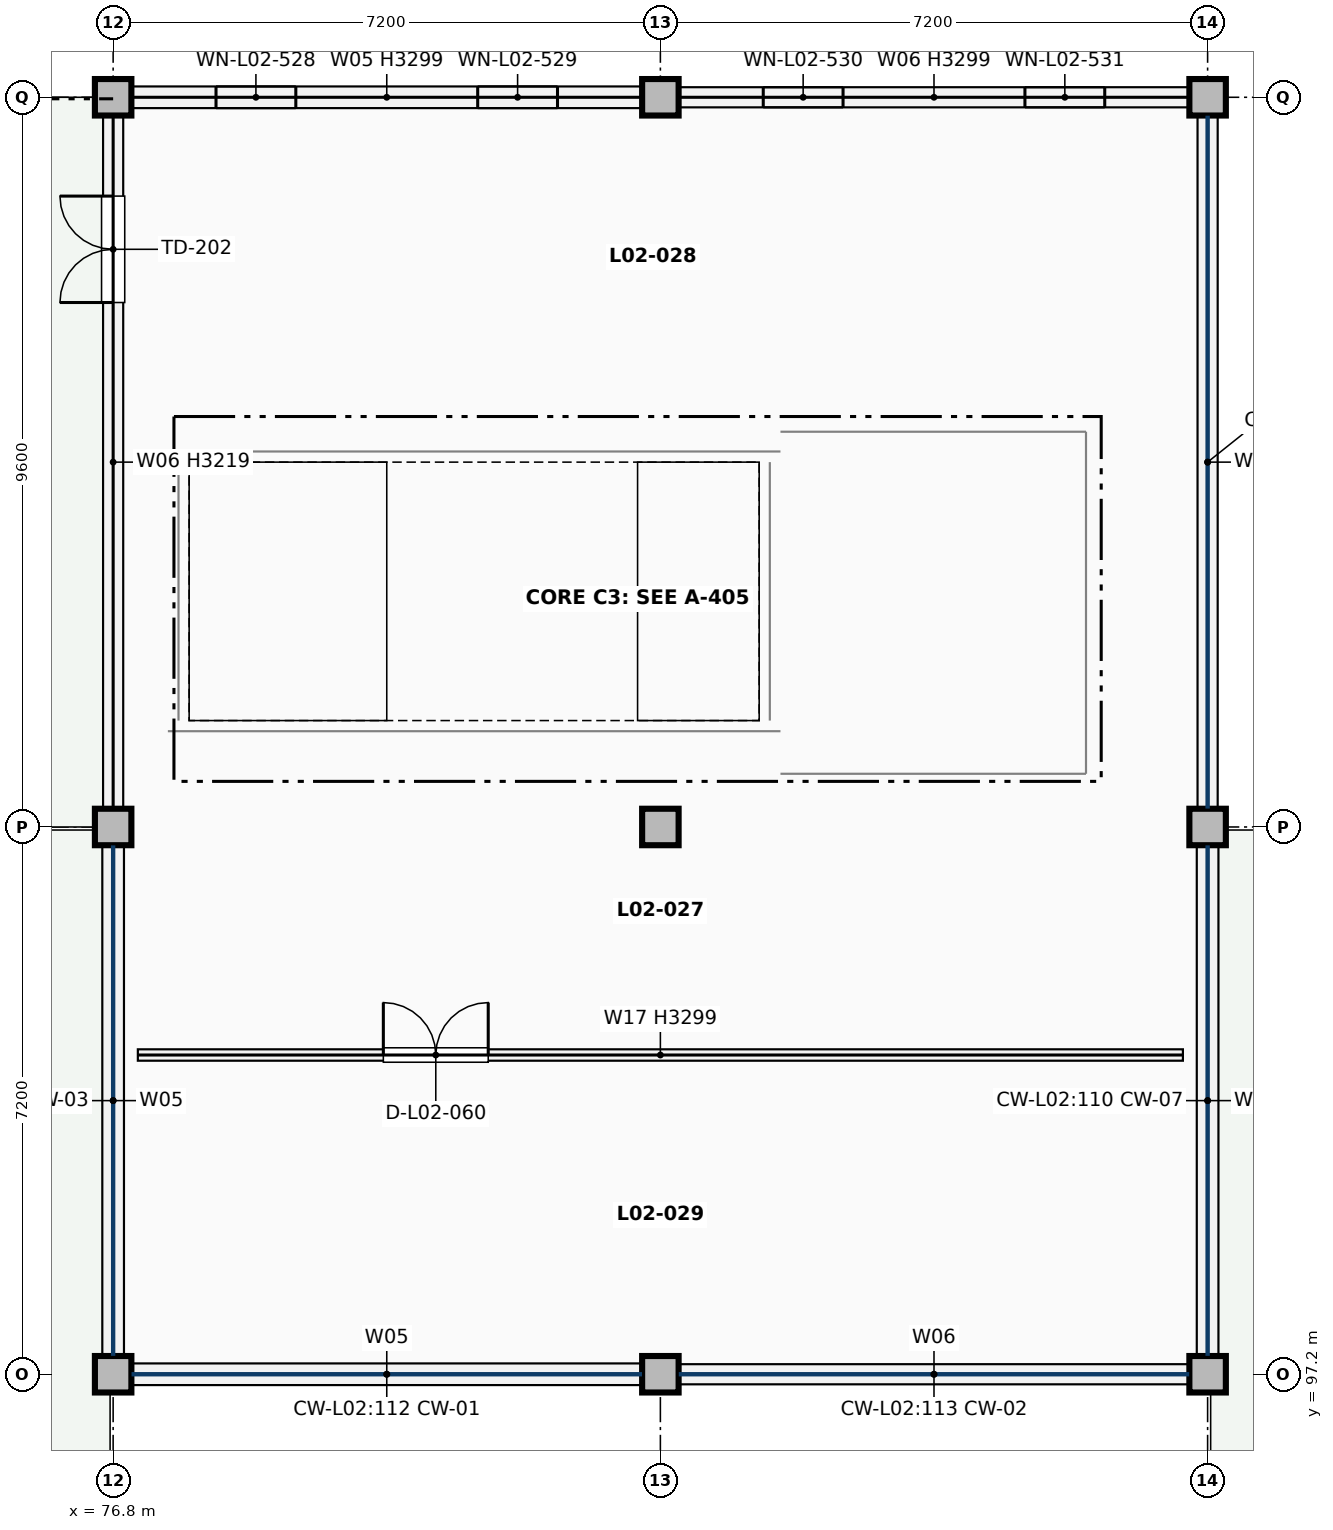
"""IFC4 building model, lengths in metres.
Left out: names, types, materials, properties, quantities, classifications, styles, units other than length and angle.
Written with IfcOpenShell. Run it as: python <this file> out.ifc"""

import sys

from ifc_helpers import new_model, si_unit, direction, frame, frame_2d, origin, origin_2d, place, context, subcontext, project, spatial, rectangle, extrude, element, fill, save


model = new_model("IFC4")
c1 = context("Model", 3, precision=1e-05, world=origin(), true_north=direction((0.0, 1.0)))
c2 = subcontext(c1, "Body", "Model", "MODEL_VIEW")
j1 = project(units=[si_unit("LENGTHUNIT", "METRE"), si_unit("PLANEANGLEUNIT", "RADIAN")], contexts=[c1])
p1 = place(None, origin())
s1 = spatial("IfcSite", under=j1, at=p1, CompositionType="ELEMENT")
p2 = place(p1, origin())
s2 = spatial("IfcBuilding", under=s1, at=p2, CompositionType="ELEMENT")
p3 = place(p2, frame((0.0, 0.0, 9.52)))
s3 = spatial("IfcBuildingStorey", under=s2, at=p3, CompositionType="ELEMENT", Elevation=9.52)
for number, where, z_axis, x_axis in (
    (1, (76.8, 97.2, 0.0), (0.0, 0.0, 1.0), (1.0, 0.0, 0.0)),
    (2, (76.8, 104.4, 0.0), (0.0, 0.0, 1.0), (1.0, 0.0, 0.0)),
    (3, (76.8, 114.0, 0.0), (0.0, 0.0, 1.0), (1.0, 0.0, 0.0)),
    (4, (84.0, 97.2, 0.0), (0.0, 0.0, 1.0), (1.0, 0.0, 0.0)),
    (5, (84.0, 104.4, 0.0), (0.0, 0.0, 1.0), (1.0, 0.0, 0.0)),
    (6, (84.0, 114.0, 0.0), (0.0, 0.0, 1.0), (1.0, 0.0, 0.0)),
    (7, (91.2, 97.2, 0.0), (0.0, 0.0, 1.0), (1.0, 0.0, 0.0)),
    (8, (91.2, 104.4, 0.0), (0.0, 0.0, 1.0), (1.0, 0.0, 0.0)),
    (9, (91.2, 114.0, 0.0), (0.0, 0.0, 1.0), (1.0, 0.0, 0.0)),
):
    element("IfcColumn", number, at=place(p3, frame(where, z_axis=z_axis, x_axis=x_axis)), inside=s3, PredefinedType="COLUMN", context=c2, shape_type="SweptSolid", body=[
        extrude(rectangle(XDim=0.48, YDim=0.48, at=origin_2d()), origin(), (0.0, 0.0, 1.0), 4.08),
    ])
p4 = place(p3, frame((91.2, 97.442, 0.0), z_axis=(0.0, 0.0, 1.0), x_axis=(0.0, 1.0, 0.0)))
e10 = element("IfcWall", 10, at=p4, inside=s3, PredefinedType="SOLIDWALL", context=c2, shape_type="SweptSolid", body=[
    extrude(rectangle(XDim=6.716, YDim=0.285, at=frame_2d((3.358, 0.0))), origin(), (0.0, 0.0, 1.0), 0.85),
])
p5 = place(p3, frame((91.2, 104.642, 0.0), z_axis=(0.0, 0.0, 1.0), x_axis=(0.0, 1.0, 0.0)))
e11 = element("IfcWall", 11, at=p5, inside=s3, PredefinedType="SOLIDWALL", context=c2, shape_type="SweptSolid", body=[
    extrude(rectangle(XDim=9.116, YDim=0.265, at=frame_2d((4.558, 0.0))), origin(), (0.0, 0.0, 1.0), 0.85),
])
p6 = place(p3, frame((77.042, 97.2, 0.0), z_axis=(0.0, 0.0, 1.0), x_axis=(1.0, 0.0, 0.0)))
e12 = element("IfcWall", 12, at=p6, inside=s3, PredefinedType="SOLIDWALL", context=c2, shape_type="SweptSolid", body=[
    extrude(rectangle(XDim=6.716, YDim=0.285, at=frame_2d((3.358, 0.0))), origin(), (0.0, 0.0, 1.0), 0.85),
])
p7 = place(p3, frame((84.242, 97.2, 0.0), z_axis=(0.0, 0.0, 1.0), x_axis=(1.0, 0.0, 0.0)))
e13 = element("IfcWall", 13, at=p7, inside=s3, PredefinedType="SOLIDWALL", context=c2, shape_type="SweptSolid", body=[
    extrude(rectangle(XDim=6.716, YDim=0.265, at=frame_2d((3.358, 0.0))), origin(), (0.0, 0.0, 1.0), 0.85),
])
p8 = place(p3, frame((76.8, 97.442, 0.0), z_axis=(0.0, 0.0, 1.0), x_axis=(0.0, 1.0, 0.0)))
e14 = element("IfcWall", 14, at=p8, inside=s3, PredefinedType="SOLIDWALL", context=c2, shape_type="SweptSolid", body=[
    extrude(rectangle(XDim=6.716, YDim=0.285, at=frame_2d((3.358, 0.0))), origin(), (0.0, 0.0, 1.0), 0.85),
])
p9 = place(p3, frame((76.8, 104.642, 0.0), z_axis=(0.0, 0.0, 1.0), x_axis=(0.0, 1.0, 0.0)))
e15 = element("IfcWall", 15, at=p9, inside=s3, PredefinedType="SOLIDWALL", context=c2, shape_type="SweptSolid", body=[
    extrude(rectangle(XDim=9.116, YDim=0.265, at=frame_2d((4.558, 0.0))), origin(), (0.0, 0.0, 1.0), 3.219),
])
p10 = place(p9, frame((6.658, 0.0, 0.0)))
e16 = element("IfcOpeningElement", 16, at=p10, cuts=e15, PredefinedType="OPENING", context=c2, shape_type="SweptSolid", body=[
    extrude(rectangle(XDim=1.4, YDim=2.2, at=frame_2d((0.7, 1.1))), frame((0.0, 0.143, 0.0), z_axis=(0.0, -1.0, 0.0), x_axis=(1.0, 0.0, 0.0)), (0.0, 0.0, 1.0), 0.285),
])
p11 = place(p3, frame((77.042, 114.0, 0.0), z_axis=(0.0, 0.0, 1.0), x_axis=(1.0, 0.0, 0.0)))
e17 = element("IfcWall", 17, at=p11, inside=s3, PredefinedType="SOLIDWALL", context=c2, shape_type="SweptSolid", body=[
    extrude(rectangle(XDim=6.716, YDim=0.285, at=frame_2d((3.358, 0.0))), origin(), (0.0, 0.0, 1.0), 3.299),
])
p12 = place(p11, frame((1.112, 0.0, 0.75)))
e18 = element("IfcOpeningElement", 18, at=p12, cuts=e17, PredefinedType="OPENING", context=c2, shape_type="SweptSolid", body=[
    extrude(rectangle(XDim=1.05, YDim=2.3, at=frame_2d((0.525, 1.15))), frame((0.0, 0.152, 0.0), z_axis=(0.0, -1.0, 0.0), x_axis=(1.0, 0.0, 0.0)), (0.0, 0.0, 1.0), 0.305),
])
p13 = place(p11, frame((4.554, 0.0, 0.75)))
e19 = element("IfcOpeningElement", 19, at=p13, cuts=e17, PredefinedType="OPENING", context=c2, shape_type="SweptSolid", body=[
    extrude(rectangle(XDim=1.05, YDim=2.3, at=frame_2d((0.525, 1.15))), frame((0.0, 0.152, 0.0), z_axis=(0.0, -1.0, 0.0), x_axis=(1.0, 0.0, 0.0)), (0.0, 0.0, 1.0), 0.305),
])
p14 = place(p3, frame((84.242, 114.0, 0.0), z_axis=(0.0, 0.0, 1.0), x_axis=(1.0, 0.0, 0.0)))
e20 = element("IfcWall", 20, at=p14, inside=s3, PredefinedType="SOLIDWALL", context=c2, shape_type="SweptSolid", body=[
    extrude(rectangle(XDim=6.716, YDim=0.265, at=frame_2d((3.358, 0.0))), origin(), (0.0, 0.0, 1.0), 3.299),
])
p15 = place(p14, frame((1.112, 0.0, 0.75)))
e21 = element("IfcOpeningElement", 21, at=p15, cuts=e20, PredefinedType="OPENING", context=c2, shape_type="SweptSolid", body=[
    extrude(rectangle(XDim=1.05, YDim=1.9, at=frame_2d((0.525, 0.95))), frame((0.0, 0.143, 0.0), z_axis=(0.0, -1.0, 0.0), x_axis=(1.0, 0.0, 0.0)), (0.0, 0.0, 1.0), 0.285),
])
p16 = place(p14, frame((4.554, 0.0, 0.75)))
e22 = element("IfcOpeningElement", 22, at=p16, cuts=e20, PredefinedType="OPENING", context=c2, shape_type="SweptSolid", body=[
    extrude(rectangle(XDim=1.05, YDim=1.9, at=frame_2d((0.525, 0.95))), frame((0.0, 0.143, 0.0), z_axis=(0.0, -1.0, 0.0), x_axis=(1.0, 0.0, 0.0)), (0.0, 0.0, 1.0), 0.285),
])
p17 = place(p3, frame((77.66, 105.8, 0.0), z_axis=(0.0, 0.0, 1.0), x_axis=(0.0, 1.0, 0.0)))
e23 = element("IfcWall", 23, at=p17, inside=s3, PredefinedType="SHEAR", context=c2, shape_type="SweptSolid", body=[
    extrude(rectangle(XDim=3.4, YDim=0.28, at=frame_2d((1.7, 0.0))), origin(), (0.0, 0.0, 1.0), 4.08),
])
for number, where, z_axis, x_axis in (
    (24, (77.52, 105.66, 0.0), (0.0, 0.0, 1.0), (1.0, 0.0, 0.0)),
    (25, (77.52, 109.34, 0.0), (0.0, 0.0, 1.0), (1.0, 0.0, 0.0)),
):
    element("IfcWall", number, at=place(p3, frame(where, z_axis=z_axis, x_axis=x_axis)), inside=s3, PredefinedType="SHEAR", context=c2, shape_type="SweptSolid", body=[
        extrude(rectangle(XDim=8.06, YDim=0.28, at=frame_2d((4.03, 0.0))), origin(), (0.0, 0.0, 1.0), 4.08),
    ])
p18 = place(p3, frame((85.44, 105.8, 0.0), z_axis=(0.0, 0.0, 1.0), x_axis=(0.0, 1.0, 0.0)))
e26 = element("IfcWall", 26, at=p18, inside=s3, PredefinedType="SHEAR", context=c2, shape_type="SweptSolid", body=[
    extrude(rectangle(XDim=3.4, YDim=0.28, at=frame_2d((1.7, 0.0))), origin(), (0.0, 0.0, 1.0), 4.08),
])
p19 = place(p18, frame((1.1, 0.0, 0.0)))
e27 = element("IfcOpeningElement", 27, at=p19, cuts=e26, PredefinedType="OPENING", context=c2, shape_type="SweptSolid", body=[
    extrude(rectangle(XDim=1.2, YDim=2.2, at=frame_2d((0.6, 1.1))), frame((0.0, 0.15, 0.0), z_axis=(0.0, -1.0, 0.0), x_axis=(1.0, 0.0, 0.0)), (0.0, 0.0, 1.0), 0.3),
])
p20 = place(p3, frame((89.6, 105.1, 0.0), z_axis=(0.0, 0.0, 1.0), x_axis=(0.0, 1.0, 0.0)))
e28 = element("IfcWall", 28, at=p20, inside=s3, PredefinedType="PARTITIONING", context=c2, shape_type="SweptSolid", body=[
    extrude(rectangle(XDim=4.5, YDim=0.2, at=frame_2d((2.25, 0.0))), origin(), (0.0, 0.0, 1.0), 3.754),
])
p21 = place(p3, frame((85.58, 105.1, 0.0), z_axis=(0.0, 0.0, 1.0), x_axis=(1.0, 0.0, 0.0)))
e29 = element("IfcWall", 29, at=p21, inside=s3, PredefinedType="PARTITIONING", context=c2, shape_type="SweptSolid", body=[
    extrude(rectangle(XDim=4.02, YDim=0.2, at=frame_2d((2.01, 0.0))), origin(), (0.0, 0.0, 1.0), 3.754),
])
p22 = place(p21, frame((1.285, 0.0, 0.0)))
e30 = element("IfcOpeningElement", 30, at=p22, cuts=e29, PredefinedType="OPENING", context=c2, shape_type="SweptSolid", body=[
    extrude(rectangle(XDim=1.45, YDim=2.2, at=frame_2d((0.725, 1.1))), frame((0.0, 0.11, 0.0), z_axis=(0.0, -1.0, 0.0), x_axis=(1.0, 0.0, 0.0)), (0.0, 0.0, 1.0), 0.22),
])
p23 = place(p3, frame((85.58, 109.6, 0.0), z_axis=(0.0, 0.0, 1.0), x_axis=(1.0, 0.0, 0.0)))
e31 = element("IfcWall", 31, at=p23, inside=s3, PredefinedType="PARTITIONING", context=c2, shape_type="SweptSolid", body=[
    extrude(rectangle(XDim=4.02, YDim=0.2, at=frame_2d((2.01, 0.0))), origin(), (0.0, 0.0, 1.0), 3.754),
])
p24 = place(p3, frame((77.125, 101.4, 0.0), z_axis=(0.0, 0.0, 1.0), x_axis=(1.0, 0.0, 0.0)))
e32 = element("IfcWall", 32, at=p24, inside=s3, PredefinedType="PARTITIONING", context=c2, shape_type="SweptSolid", body=[
    extrude(rectangle(XDim=13.75, YDim=0.15, at=frame_2d((6.875, 0.0))), origin(), (0.0, 0.0, 1.0), 3.299),
])
p25 = place(p24, frame((3.23, 0.0, 0.0)))
e33 = element("IfcOpeningElement", 33, at=p25, cuts=e32, PredefinedType="OPENING", context=c2, shape_type="SweptSolid", body=[
    extrude(rectangle(XDim=1.38, YDim=2.28, at=frame_2d((0.69, 1.14))), frame((0.0, 0.085, 0.0), z_axis=(0.0, -1.0, 0.0), x_axis=(1.0, 0.0, 0.0)), (0.0, 0.0, 1.0), 0.17),
])
p26 = place(p10, origin())
e34 = element("IfcDoor", 34, at=p26, inside=s3, OperationType="DOUBLE_DOOR_SINGLE_SWING", PredefinedType="DOOR", context=c2, shape_type="SweptSolid", body=[
    extrude(rectangle(XDim=1.4, YDim=2.2, at=frame_2d((0.7, 1.1))), frame((0.0, 0.025, 0.0), z_axis=(0.0, -1.0, 0.0), x_axis=(1.0, 0.0, 0.0)), (0.0, 0.0, 1.0), 0.05),
])
fill(e16, e34)
p27 = place(p12, origin())
e35 = element("IfcWindow", 35, at=p27, inside=s3, PartitioningType="SINGLE_PANEL", PredefinedType="WINDOW", context=c2, shape_type="SweptSolid", body=[
    extrude(rectangle(XDim=1.05, YDim=2.3, at=frame_2d((0.525, 1.15))), frame((0.0, 0.03, 0.0), z_axis=(0.0, -1.0, 0.0), x_axis=(1.0, 0.0, 0.0)), (0.0, 0.0, 1.0), 0.06),
])
fill(e18, e35)
p28 = place(p13, origin())
e36 = element("IfcWindow", 36, at=p28, inside=s3, PartitioningType="SINGLE_PANEL", PredefinedType="WINDOW", context=c2, shape_type="SweptSolid", body=[
    extrude(rectangle(XDim=1.05, YDim=2.3, at=frame_2d((0.525, 1.15))), frame((0.0, 0.03, 0.0), z_axis=(0.0, -1.0, 0.0), x_axis=(1.0, 0.0, 0.0)), (0.0, 0.0, 1.0), 0.06),
])
fill(e19, e36)
p29 = place(p15, origin())
e37 = element("IfcWindow", 37, at=p29, inside=s3, PartitioningType="SINGLE_PANEL", PredefinedType="WINDOW", context=c2, shape_type="SweptSolid", body=[
    extrude(rectangle(XDim=1.05, YDim=1.9, at=frame_2d((0.525, 0.95))), frame((0.0, 0.03, 0.0), z_axis=(0.0, -1.0, 0.0), x_axis=(1.0, 0.0, 0.0)), (0.0, 0.0, 1.0), 0.06),
])
fill(e21, e37)
p30 = place(p16, origin())
e38 = element("IfcWindow", 38, at=p30, inside=s3, PartitioningType="SINGLE_PANEL", PredefinedType="WINDOW", context=c2, shape_type="SweptSolid", body=[
    extrude(rectangle(XDim=1.05, YDim=1.9, at=frame_2d((0.525, 0.95))), frame((0.0, 0.03, 0.0), z_axis=(0.0, -1.0, 0.0), x_axis=(1.0, 0.0, 0.0)), (0.0, 0.0, 1.0), 0.06),
])
fill(e22, e38)
p31 = place(p19, origin())
e39 = element("IfcDoor", 39, at=p31, inside=s3, OperationType="SINGLE_SWING_LEFT", PredefinedType="DOOR", context=c2, shape_type="SweptSolid", body=[
    extrude(rectangle(XDim=1.2, YDim=2.2, at=frame_2d((0.6, 1.1))), frame((0.0, 0.025, 0.0), z_axis=(0.0, -1.0, 0.0), x_axis=(1.0, 0.0, 0.0)), (0.0, 0.0, 1.0), 0.05),
])
fill(e27, e39)
p32 = place(p22, frame((1.45, 0.0, 0.0), z_axis=(0.0, 0.0, 1.0), x_axis=(-1.0, 0.0, 0.0)))
e40 = element("IfcDoor", 40, at=p32, inside=s3, OperationType="DOUBLE_DOOR_SINGLE_SWING", PredefinedType="DOOR", context=c2, shape_type="SweptSolid", body=[
    extrude(rectangle(XDim=1.45, YDim=2.2, at=frame_2d((0.725, 1.1))), frame((0.0, 0.025, 0.0), z_axis=(0.0, -1.0, 0.0), x_axis=(1.0, 0.0, 0.0)), (0.0, 0.0, 1.0), 0.05),
])
fill(e30, e40)
p33 = place(p25, origin())
e41 = element("IfcDoor", 41, at=p33, inside=s3, OperationType="DOUBLE_DOOR_SINGLE_SWING", PredefinedType="DOOR", context=c2, shape_type="SweptSolid", body=[
    extrude(rectangle(XDim=1.38, YDim=2.28, at=frame_2d((0.69, 1.14))), frame((0.0, 0.025, 0.0), z_axis=(0.0, -1.0, 0.0), x_axis=(1.0, 0.0, 0.0)), (0.0, 0.0, 1.0), 0.05),
])
fill(e33, e41)
save(model, sys.argv[1])
